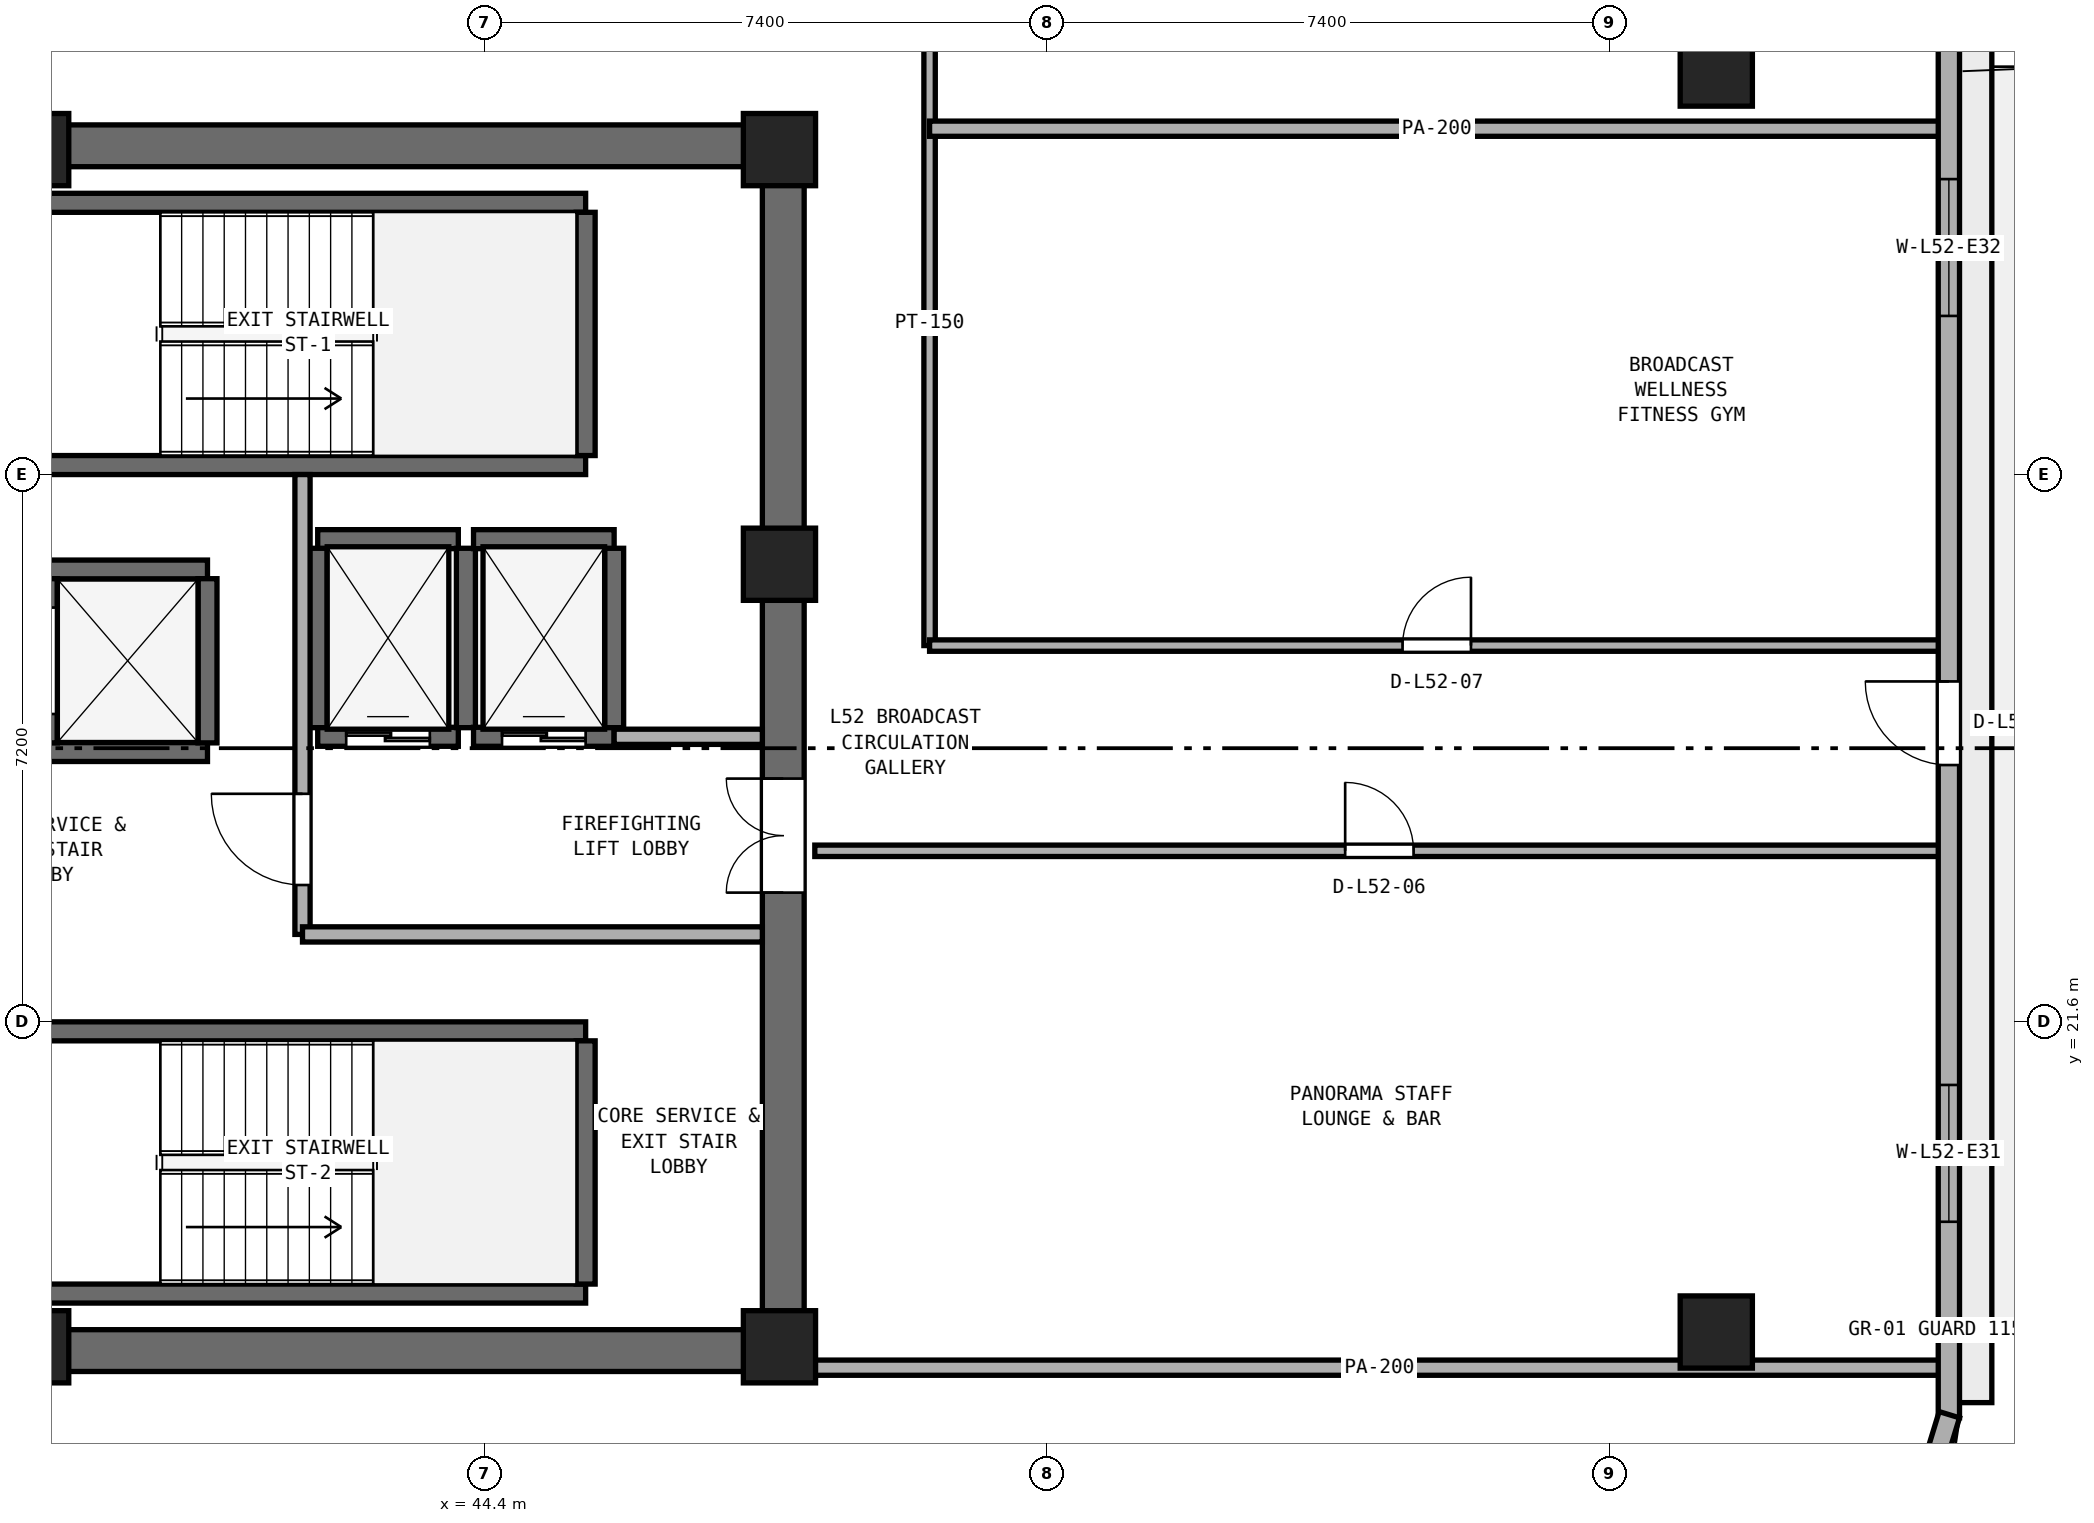
"""IFC4 building model, lengths in metres.
Left out: names, types, materials, properties, quantities, classifications, styles, units other than length and angle.
Written with IfcOpenShell. Run it as: python <this file> out.ifc"""

import sys

from ifc_helpers import new_model, si_unit, direction, frame, frame_2d, origin, origin_2d, place, context, subcontext, project, spatial, rectangle, extrude, element, fill, save


model = new_model("IFC4")
c1 = context("Model", 3, precision=1e-05, world=origin(), true_north=direction((0.0, 1.0)))
c2 = subcontext(c1, "Body", "Model", "MODEL_VIEW")
j1 = project(units=[si_unit("LENGTHUNIT", "METRE"), si_unit("PLANEANGLEUNIT", "RADIAN")], contexts=[c1])
p1 = place(None, origin())
s1 = spatial("IfcSite", under=j1, at=p1, CompositionType="ELEMENT")
p2 = place(p1, origin())
s2 = spatial("IfcBuilding", under=s1, at=p2, CompositionType="ELEMENT")
p3 = place(p2, frame((0.0, 0.0, 204.8)))
s3 = spatial("IfcBuildingStorey", under=s2, at=p3, CompositionType="ELEMENT", Elevation=204.8)
for number, where, z_axis, x_axis in (
    (1, (25.4, 17.275, 0.0), (0.0, 0.0, 1.0), (1.0, 0.0, 0.0)),
    (2, (25.4, 33.125, 0.0), (0.0, 0.0, 1.0), (1.0, 0.0, 0.0)),
):
    element("IfcWall", number, at=place(p3, frame(where, z_axis=z_axis, x_axis=x_axis)), inside=s3, PredefinedType="SHEAR", context=c2, shape_type="SweptSolid", body=[
        extrude(rectangle(XDim=23.2, YDim=0.55, at=frame_2d((11.6, 0.0))), origin(), (0.0, 0.0, 1.0), 3.54),
    ])
p4 = place(p3, frame((48.325, 17.55, 0.0), z_axis=(0.0, 0.0, 1.0), x_axis=(0.0, 1.0, 0.0)))
e3 = element("IfcWall", 3, at=p4, inside=s3, PredefinedType="SHEAR", context=c2, shape_type="SweptSolid", body=[
    extrude(rectangle(XDim=15.3, YDim=0.55, at=frame_2d((7.65, 0.0))), origin(), (0.0, 0.0, 1.0), 3.54),
])
p5 = place(p4, frame((5.75, 0.0, 0.0)))
e4 = element("IfcOpeningElement", 4, at=p5, cuts=e3, PredefinedType="OPENING", context=c2, shape_type="SweptSolid", body=[
    extrude(rectangle(XDim=1.5, YDim=2.15, at=frame_2d((0.75, 1.075))), frame((0.0, 0.285, 0.0), z_axis=(0.0, -1.0, 0.0), x_axis=(1.0, 0.0, 0.0)), (0.0, 0.0, 1.0), 0.57),
])
for number, where, z_axis, x_axis in (
    (5, (38.45, 17.325, 0.0), (0.0, 0.0, 1.0), (1.0, 0.0, 0.0)),
    (6, (48.275, 17.325, 0.0), (0.0, 0.0, 1.0), (1.0, 0.0, 0.0)),
    (7, (48.275, 27.62, 0.0), (0.0, 0.0, 1.0), (1.0, 0.0, 0.0)),
    (8, (48.275, 33.075, 0.0), (0.0, 0.0, 1.0), (1.0, 0.0, 0.0)),
    (9, (38.45, 33.075, 0.0), (0.0, 0.0, 1.0), (1.0, 0.0, 0.0)),
):
    element("IfcColumn", number, at=place(p3, frame(where, z_axis=z_axis, x_axis=x_axis)), inside=s3, PredefinedType="PILASTER", context=c2, shape_type="SweptSolid", body=[
        extrude(rectangle(XDim=0.95, YDim=0.95, at=origin_2d()), origin(), (0.0, 0.0, 1.0), 3.8),
    ])
for number, where, z_axis, x_axis in (
    (10, (60.6, 17.519, 0.0), (0.0, 0.0, 1.0), (1.0, 0.0, 0.0)),
    (11, (60.6, 34.122, 0.0), (0.0, 0.0, 1.0), (1.0, 0.0, 0.0)),
):
    element("IfcColumn", number, at=place(p3, frame(where, z_axis=z_axis, x_axis=x_axis)), inside=s3, PredefinedType="COLUMN", context=c2, shape_type="SweptSolid", body=[
        extrude(rectangle(XDim=0.95, YDim=0.95, at=origin_2d()), origin(), (0.0, 0.0, 1.0), 3.8),
    ])
for number, where, z_axis, x_axis in (
    (12, (38.425, 28.925, 0.0), (0.0, 0.0, 1.0), (1.0, 0.0, 0.0)),
    (13, (38.425, 32.375, 0.0), (0.0, 0.0, 1.0), (1.0, 0.0, 0.0)),
):
    element("IfcWall", number, at=place(p3, frame(where, z_axis=z_axis, x_axis=x_axis)), inside=s3, PredefinedType="SHEAR", context=c2, shape_type="SweptSolid", body=[
        extrude(rectangle(XDim=7.3, YDim=0.25, at=frame_2d((3.65, 0.0))), origin(), (0.0, 0.0, 1.0), 3.54),
    ])
p6 = place(p3, frame((45.725, 29.05, 0.0), z_axis=(0.0, 0.0, 1.0), x_axis=(0.0, 1.0, 0.0)))
e14 = element("IfcWall", 14, at=p6, inside=s3, PredefinedType="SHEAR", context=c2, shape_type="SweptSolid", body=[
    extrude(rectangle(XDim=3.2, YDim=0.25, at=frame_2d((1.6, 0.0))), origin(), (0.0, 0.0, 1.0), 3.54),
])
for number, where, z_axis, x_axis in (
    (15, (38.425, 18.025, 0.0), (0.0, 0.0, 1.0), (1.0, 0.0, 0.0)),
    (16, (38.425, 21.475, 0.0), (0.0, 0.0, 1.0), (1.0, 0.0, 0.0)),
):
    element("IfcWall", number, at=place(p3, frame(where, z_axis=z_axis, x_axis=x_axis)), inside=s3, PredefinedType="SHEAR", context=c2, shape_type="SweptSolid", body=[
        extrude(rectangle(XDim=7.3, YDim=0.25, at=frame_2d((3.65, 0.0))), origin(), (0.0, 0.0, 1.0), 3.54),
    ])
p7 = place(p3, frame((45.725, 18.15, 0.0), z_axis=(0.0, 0.0, 1.0), x_axis=(0.0, 1.0, 0.0)))
e17 = element("IfcWall", 17, at=p7, inside=s3, PredefinedType="SHEAR", context=c2, shape_type="SweptSolid", body=[
    extrude(rectangle(XDim=3.2, YDim=0.25, at=frame_2d((1.6, 0.0))), origin(), (0.0, 0.0, 1.0), 3.54),
])
p8 = place(p3, frame((42.2, 25.35, 0.0), z_axis=(0.0, 0.0, 1.0), x_axis=(1.0, 0.0, 0.0)))
e18 = element("IfcWall", 18, at=p8, inside=s3, PredefinedType="SHEAR", context=c2, shape_type="SweptSolid", body=[
    extrude(rectangle(XDim=1.85, YDim=0.25, at=frame_2d((0.925, 0.0))), origin(), (0.0, 0.0, 1.0), 3.54),
])
p9 = place(p8, frame((0.375, 0.0, 0.0)))
e19 = element("IfcOpeningElement", 19, at=p9, cuts=e18, PredefinedType="OPENING", context=c2, shape_type="SweptSolid", body=[
    extrude(rectangle(XDim=1.1, YDim=2.15, at=frame_2d((0.55, 1.075))), frame((0.0, 0.135, 0.0), z_axis=(0.0, -1.0, 0.0), x_axis=(1.0, 0.0, 0.0)), (0.0, 0.0, 1.0), 0.27),
])
p10 = place(p3, frame((42.2, 27.95, 0.0), z_axis=(0.0, 0.0, 1.0), x_axis=(1.0, 0.0, 0.0)))
e20 = element("IfcWall", 20, at=p10, inside=s3, PredefinedType="SHEAR", context=c2, shape_type="SweptSolid", body=[
    extrude(rectangle(XDim=1.85, YDim=0.25, at=frame_2d((0.925, 0.0))), origin(), (0.0, 0.0, 1.0), 3.54),
])
for number, where, z_axis, x_axis in (
    (21, (42.2, 25.47, 0.0), (0.0, 0.0, 1.0), (0.0, 1.0, 0.0)),
    (22, (44.15, 25.47, 0.0), (0.0, 0.0, 1.0), (0.0, 1.0, 0.0)),
):
    element("IfcWall", number, at=place(p3, frame(where, z_axis=z_axis, x_axis=x_axis)), inside=s3, PredefinedType="SHEAR", context=c2, shape_type="SweptSolid", body=[
        extrude(rectangle(XDim=2.36, YDim=0.25, at=frame_2d((1.18, 0.0))), origin(), (0.0, 0.0, 1.0), 3.54),
    ])
p11 = place(p3, frame((44.25, 25.35, 0.0), z_axis=(0.0, 0.0, 1.0), x_axis=(1.0, 0.0, 0.0)))
e23 = element("IfcWall", 23, at=p11, inside=s3, PredefinedType="SHEAR", context=c2, shape_type="SweptSolid", body=[
    extrude(rectangle(XDim=1.85, YDim=0.25, at=frame_2d((0.925, 0.0))), origin(), (0.0, 0.0, 1.0), 3.54),
])
p12 = place(p11, frame((0.375, 0.0, 0.0)))
e24 = element("IfcOpeningElement", 24, at=p12, cuts=e23, PredefinedType="OPENING", context=c2, shape_type="SweptSolid", body=[
    extrude(rectangle(XDim=1.1, YDim=2.15, at=frame_2d((0.55, 1.075))), frame((0.0, 0.135, 0.0), z_axis=(0.0, -1.0, 0.0), x_axis=(1.0, 0.0, 0.0)), (0.0, 0.0, 1.0), 0.27),
])
p13 = place(p3, frame((44.25, 27.95, 0.0), z_axis=(0.0, 0.0, 1.0), x_axis=(1.0, 0.0, 0.0)))
e25 = element("IfcWall", 25, at=p13, inside=s3, PredefinedType="SHEAR", context=c2, shape_type="SweptSolid", body=[
    extrude(rectangle(XDim=1.85, YDim=0.25, at=frame_2d((0.925, 0.0))), origin(), (0.0, 0.0, 1.0), 3.54),
])
p14 = place(p3, frame((46.1, 25.47, 0.0), z_axis=(0.0, 0.0, 1.0), x_axis=(0.0, 1.0, 0.0)))
e26 = element("IfcWall", 26, at=p14, inside=s3, PredefinedType="SHEAR", context=c2, shape_type="SweptSolid", body=[
    extrude(rectangle(XDim=2.36, YDim=0.25, at=frame_2d((1.18, 0.0))), origin(), (0.0, 0.0, 1.0), 3.54),
])
for number, where, z_axis, x_axis in (
    (27, (38.65, 25.15, 0.0), (0.0, 0.0, 1.0), (1.0, 0.0, 0.0)),
    (28, (38.65, 27.55, 0.0), (0.0, 0.0, 1.0), (1.0, 0.0, 0.0)),
):
    element("IfcWall", number, at=place(p3, frame(where, z_axis=z_axis, x_axis=x_axis)), inside=s3, PredefinedType="SHEAR", context=c2, shape_type="SweptSolid", body=[
        extrude(rectangle(XDim=2.1, YDim=0.25, at=frame_2d((1.05, 0.0))), origin(), (0.0, 0.0, 1.0), 3.54),
    ])
p15 = place(p3, frame((38.65, 25.27, 0.0), z_axis=(0.0, 0.0, 1.0), x_axis=(0.0, 1.0, 0.0)))
e29 = element("IfcWall", 29, at=p15, inside=s3, PredefinedType="SHEAR", context=c2, shape_type="SweptSolid", body=[
    extrude(rectangle(XDim=2.16, YDim=0.25, at=frame_2d((1.08, 0.0))), origin(), (0.0, 0.0, 1.0), 3.54),
])
p16 = place(p15, frame((0.38, 0.0, 0.0)))
e30 = element("IfcOpeningElement", 30, at=p16, cuts=e29, PredefinedType="OPENING", context=c2, shape_type="SweptSolid", body=[
    extrude(rectangle(XDim=1.4, YDim=2.2, at=frame_2d((0.7, 1.1))), frame((0.0, 0.135, 0.0), z_axis=(0.0, -1.0, 0.0), x_axis=(1.0, 0.0, 0.0)), (0.0, 0.0, 1.0), 0.27),
])
p17 = place(p3, frame((40.75, 25.27, 0.0), z_axis=(0.0, 0.0, 1.0), x_axis=(0.0, 1.0, 0.0)))
e31 = element("IfcWall", 31, at=p17, inside=s3, PredefinedType="SHEAR", context=c2, shape_type="SweptSolid", body=[
    extrude(rectangle(XDim=2.16, YDim=0.25, at=frame_2d((1.08, 0.0))), origin(), (0.0, 0.0, 1.0), 3.54),
])
p18 = place(p3, frame((42.0, 22.75, 0.0), z_axis=(0.0, 0.0, 1.0), x_axis=(0.0, 1.0, 0.0)))
e32 = element("IfcWall", 32, at=p18, inside=s3, PredefinedType="SOLIDWALL", context=c2, shape_type="SweptSolid", body=[
    extrude(rectangle(XDim=6.05, YDim=0.2, at=frame_2d((3.025, 0.0))), origin(), (0.0, 0.0, 1.0), 3.54),
])
p19 = place(p18, frame((0.65, 0.0, 0.0)))
e33 = element("IfcOpeningElement", 33, at=p19, cuts=e32, PredefinedType="OPENING", context=c2, shape_type="SweptSolid", body=[
    extrude(rectangle(XDim=1.2, YDim=2.15, at=frame_2d((0.6, 1.075))), frame((0.0, 0.11, 0.0), z_axis=(0.0, -1.0, 0.0), x_axis=(1.0, 0.0, 0.0)), (0.0, 0.0, 1.0), 0.22),
])
p20 = place(p3, frame((42.0, 22.75, 0.0), z_axis=(0.0, 0.0, 1.0), x_axis=(1.0, 0.0, 0.0)))
e34 = element("IfcWall", 34, at=p20, inside=s3, PredefinedType="SOLIDWALL", context=c2, shape_type="SweptSolid", body=[
    extrude(rectangle(XDim=6.05, YDim=0.2, at=frame_2d((3.025, 0.0))), origin(), (0.0, 0.0, 1.0), 3.54),
])
p21 = place(p3, frame((46.1, 25.35, 0.0), z_axis=(0.0, 0.0, 1.0), x_axis=(1.0, 0.0, 0.0)))
e35 = element("IfcWall", 35, at=p21, inside=s3, PredefinedType="SOLIDWALL", context=c2, shape_type="SweptSolid", body=[
    extrude(rectangle(XDim=1.95, YDim=0.2, at=frame_2d((0.975, 0.0))), origin(), (0.0, 0.0, 1.0), 3.54),
])
p22 = place(p3, frame((50.25, 26.55, 0.0), z_axis=(0.0, 0.0, 1.0), x_axis=(0.0, 1.0, 0.0)))
e36 = element("IfcWall", 36, at=p22, inside=s3, PredefinedType="PARTITIONING", context=c2, shape_type="SweptSolid", body=[
    extrude(rectangle(XDim=8.5, YDim=0.15, at=frame_2d((4.25, 0.0))), origin(), (0.0, 0.0, 1.0), 3.54),
])
p23 = place(p3, frame((48.74, 17.05, 0.0), z_axis=(0.0, 0.0, 1.0), x_axis=(1.0, 0.0, 0.0)))
e37 = element("IfcWall", 37, at=p23, inside=s3, PredefinedType="PARTITIONING", context=c2, shape_type="SweptSolid", body=[
    extrude(rectangle(XDim=14.855, YDim=0.2, at=frame_2d((7.427, 0.0))), origin(), (0.0, 0.0, 1.0), 2.923),
])
p24 = place(p3, frame((48.74, 23.85, 0.0), z_axis=(0.0, 0.0, 1.0), x_axis=(1.0, 0.0, 0.0)))
e38 = element("IfcWall", 38, at=p24, inside=s3, PredefinedType="PARTITIONING", context=c2, shape_type="SweptSolid", body=[
    extrude(rectangle(XDim=14.855, YDim=0.15, at=frame_2d((7.427, 0.0))), origin(), (0.0, 0.0, 1.0), 3.54),
])
p25 = place(p24, frame((6.978, 0.0, 0.0)))
e39 = element("IfcOpeningElement", 39, at=p25, cuts=e38, PredefinedType="OPENING", context=c2, shape_type="SweptSolid", body=[
    extrude(rectangle(XDim=0.9, YDim=2.1, at=frame_2d((0.45, 1.05))), frame((0.0, 0.085, 0.0), z_axis=(0.0, -1.0, 0.0), x_axis=(1.0, 0.0, 0.0)), (0.0, 0.0, 1.0), 0.17),
])
p26 = place(p3, frame((50.25, 26.55, 0.0), z_axis=(0.0, 0.0, 1.0), x_axis=(1.0, 0.0, 0.0)))
e40 = element("IfcWall", 40, at=p26, inside=s3, PredefinedType="PARTITIONING", context=c2, shape_type="SweptSolid", body=[
    extrude(rectangle(XDim=13.345, YDim=0.15, at=frame_2d((6.672, 0.0))), origin(), (0.0, 0.0, 1.0), 3.54),
])
p27 = place(p26, frame((6.222, 0.0, 0.0)))
e41 = element("IfcOpeningElement", 41, at=p27, cuts=e40, PredefinedType="OPENING", context=c2, shape_type="SweptSolid", body=[
    extrude(rectangle(XDim=0.9, YDim=2.1, at=frame_2d((0.45, 1.05))), frame((0.0, 0.085, 0.0), z_axis=(0.0, -1.0, 0.0), x_axis=(1.0, 0.0, 0.0)), (0.0, 0.0, 1.0), 0.17),
])
p28 = place(p3, frame((50.25, 33.35, 0.0), z_axis=(0.0, 0.0, 1.0), x_axis=(1.0, 0.0, 0.0)))
e42 = element("IfcWall", 42, at=p28, inside=s3, PredefinedType="PARTITIONING", context=c2, shape_type="SweptSolid", body=[
    extrude(rectangle(XDim=13.345, YDim=0.2, at=frame_2d((6.672, 0.0))), origin(), (0.0, 0.0, 1.0), 2.79),
])
p29 = place(p3, frame((63.66, 16.39, 0.0), z_axis=(0.0, 0.0, 1.0), x_axis=(0.0, 1.0, 0.0)))
e43 = element("IfcWall", 43, at=p29, inside=s3, PredefinedType="STANDARD", context=c2, shape_type="SweptSolid", body=[
    extrude(rectangle(XDim=18.876, YDim=0.28, at=frame_2d((9.438, 0.0))), origin(), (0.0, 0.0, 1.0), 2.79),
])
p30 = place(p29, frame((8.588, 0.0, 0.0)))
e44 = element("IfcOpeningElement", 44, at=p30, cuts=e43, PredefinedType="OPENING", context=c2, shape_type="SweptSolid", body=[
    extrude(rectangle(XDim=1.1, YDim=2.2, at=frame_2d((0.55, 1.1))), frame((0.0, 0.15, 0.0), z_axis=(0.0, -1.0, 0.0), x_axis=(1.0, 0.0, 0.0)), (0.0, 0.0, 1.0), 0.3),
])
p31 = place(p29, frame((2.579, 0.0, 0.85)))
e45 = element("IfcOpeningElement", 45, at=p31, cuts=e43, PredefinedType="OPENING", context=c2, shape_type="SweptSolid", body=[
    extrude(rectangle(XDim=1.8, YDim=1.2, at=frame_2d((0.9, 0.6))), frame((0.0, 0.15, 0.0), z_axis=(0.0, -1.0, 0.0), x_axis=(1.0, 0.0, 0.0)), (0.0, 0.0, 1.0), 0.3),
])
p32 = place(p29, frame((14.497, 0.0, 0.85)))
e46 = element("IfcOpeningElement", 46, at=p32, cuts=e43, PredefinedType="OPENING", context=c2, shape_type="SweptSolid", body=[
    extrude(rectangle(XDim=1.8, YDim=1.2, at=frame_2d((0.9, 0.6))), frame((0.0, 0.15, 0.0), z_axis=(0.0, -1.0, 0.0), x_axis=(1.0, 0.0, 0.0)), (0.0, 0.0, 1.0), 0.3),
])
p33 = place(p3, frame((62.982, 14.194, 0.0), z_axis=(0.0, 0.0, 1.0), x_axis=(0.292398811023, 0.956296468315, 0.0)))
e47 = element("IfcWall", 47, at=p33, inside=s3, PredefinedType="STANDARD", context=c2, shape_type="SweptSolid", body=[
    extrude(rectangle(XDim=2.34, YDim=0.28, at=frame_2d((1.17, 0.0))), origin(), (0.0, 0.0, 1.0), 3.54),
])
p34 = place(p9, origin())
e48 = element("IfcDoor", 48, at=p34, inside=s3, OperationType="DOUBLE_DOOR_SLIDING", PredefinedType="DOOR", context=c2, shape_type="SweptSolid", body=[
    extrude(rectangle(XDim=1.1, YDim=2.15, at=frame_2d((0.55, 1.075))), frame((0.0, 0.025, 0.0), z_axis=(0.0, -1.0, 0.0), x_axis=(1.0, 0.0, 0.0)), (0.0, 0.0, 1.0), 0.05),
])
fill(e19, e48)
p35 = place(p12, origin())
e49 = element("IfcDoor", 49, at=p35, inside=s3, OperationType="DOUBLE_DOOR_SLIDING", PredefinedType="DOOR", context=c2, shape_type="SweptSolid", body=[
    extrude(rectangle(XDim=1.1, YDim=2.15, at=frame_2d((0.55, 1.075))), frame((0.0, 0.025, 0.0), z_axis=(0.0, -1.0, 0.0), x_axis=(1.0, 0.0, 0.0)), (0.0, 0.0, 1.0), 0.05),
])
fill(e24, e49)
p36 = place(p19, origin())
e50 = element("IfcDoor", 50, at=p36, inside=s3, OperationType="SINGLE_SWING_RIGHT", PredefinedType="DOOR", context=c2, shape_type="SweptSolid", body=[
    extrude(rectangle(XDim=1.2, YDim=2.15, at=frame_2d((0.6, 1.075))), frame((0.0, 0.025, 0.0), z_axis=(0.0, -1.0, 0.0), x_axis=(1.0, 0.0, 0.0)), (0.0, 0.0, 1.0), 0.05),
])
fill(e33, e50)
p37 = place(p5, origin())
e51 = element("IfcDoor", 51, at=p37, inside=s3, OperationType="DOUBLE_DOOR_SINGLE_SWING", PredefinedType="DOOR", context=c2, shape_type="SweptSolid", body=[
    extrude(rectangle(XDim=1.5, YDim=2.15, at=frame_2d((0.75, 1.075))), frame((0.0, 0.025, 0.0), z_axis=(0.0, -1.0, 0.0), x_axis=(1.0, 0.0, 0.0)), (0.0, 0.0, 1.0), 0.05),
])
fill(e4, e51)
p38 = place(p25, origin())
e52 = element("IfcDoor", 52, at=p38, inside=s3, OperationType="SINGLE_SWING_LEFT", PredefinedType="DOOR", context=c2, shape_type="SweptSolid", body=[
    extrude(rectangle(XDim=0.9, YDim=2.1, at=frame_2d((0.45, 1.05))), frame((0.0, 0.025, 0.0), z_axis=(0.0, -1.0, 0.0), x_axis=(1.0, 0.0, 0.0)), (0.0, 0.0, 1.0), 0.05),
])
fill(e39, e52)
p39 = place(p27, origin())
e53 = element("IfcDoor", 53, at=p39, inside=s3, OperationType="SINGLE_SWING_RIGHT", PredefinedType="DOOR", context=c2, shape_type="SweptSolid", body=[
    extrude(rectangle(XDim=0.9, YDim=2.1, at=frame_2d((0.45, 1.05))), frame((0.0, 0.025, 0.0), z_axis=(0.0, -1.0, 0.0), x_axis=(1.0, 0.0, 0.0)), (0.0, 0.0, 1.0), 0.05),
])
fill(e41, e53)
p40 = place(p30, origin())
e54 = element("IfcDoor", 54, at=p40, inside=s3, OperationType="SINGLE_SWING_RIGHT", PredefinedType="DOOR", context=c2, shape_type="SweptSolid", body=[
    extrude(rectangle(XDim=1.1, YDim=2.2, at=frame_2d((0.55, 1.1))), frame((0.0, 0.025, 0.0), z_axis=(0.0, -1.0, 0.0), x_axis=(1.0, 0.0, 0.0)), (0.0, 0.0, 1.0), 0.05),
])
fill(e44, e54)
p41 = place(p31, origin())
e55 = element("IfcWindow", 55, at=p41, inside=s3, PartitioningType="SINGLE_PANEL", PredefinedType="WINDOW", context=c2, shape_type="SweptSolid", body=[
    extrude(rectangle(XDim=1.8, YDim=1.2, at=frame_2d((0.9, 0.6))), frame((0.0, 0.03, 0.0), z_axis=(0.0, -1.0, 0.0), x_axis=(1.0, 0.0, 0.0)), (0.0, 0.0, 1.0), 0.06),
])
fill(e45, e55)
p42 = place(p32, origin())
e56 = element("IfcWindow", 56, at=p42, inside=s3, PartitioningType="SINGLE_PANEL", PredefinedType="WINDOW", context=c2, shape_type="SweptSolid", body=[
    extrude(rectangle(XDim=1.8, YDim=1.2, at=frame_2d((0.9, 0.6))), frame((0.0, 0.03, 0.0), z_axis=(0.0, -1.0, 0.0), x_axis=(1.0, 0.0, 0.0)), (0.0, 0.0, 1.0), 0.06),
])
fill(e46, e56)
save(model, sys.argv[1])
